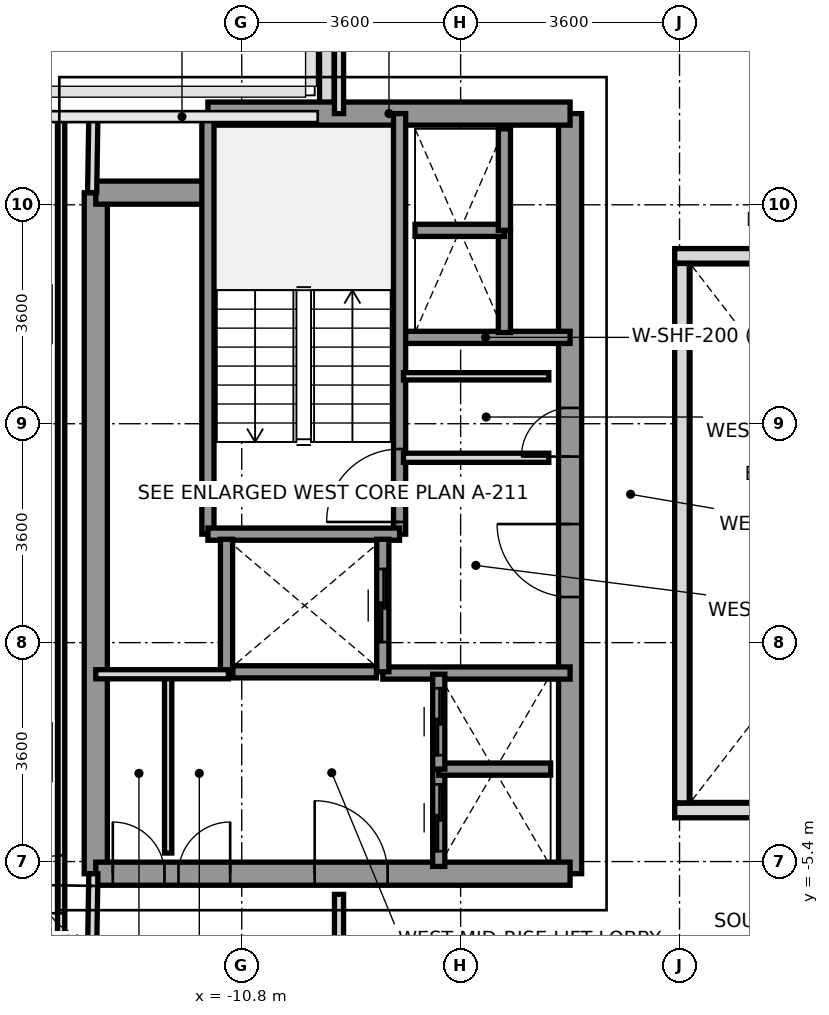
"""IFC4 building model, lengths in metres.
Left out: names, types, materials, properties, quantities, classifications, styles, units other than length and angle.
Written with IfcOpenShell. Run it as: python <this file> out.ifc"""

import sys

from ifc_helpers import new_model, si_unit, direction, frame, frame_2d, origin, place, context, subcontext, project, spatial, rectangle, extrude, source, transform, mapped, element, fill, save


model = new_model("IFC4")
c1 = context("Model", 3, precision=1e-05, world=origin(), true_north=direction((0.0, 1.0)))
c2 = subcontext(c1, "Body", "Model", "MODEL_VIEW")
j1 = project(units=[si_unit("LENGTHUNIT", "METRE"), si_unit("PLANEANGLEUNIT", "RADIAN")], contexts=[c1])
p1 = place(None, origin())
s1 = spatial("IfcSite", under=j1, at=p1, CompositionType="ELEMENT")
p2 = place(p1, origin())
s2 = spatial("IfcBuilding", under=s1, at=p2, CompositionType="ELEMENT")
p3 = place(p2, frame((0.0, 0.0, 167.2)))
s3 = spatial("IfcBuildingStorey", under=s2, at=p3, CompositionType="ELEMENT", Elevation=167.2)
p4 = place(p3, frame((-9.4, 6.953, 0.0), z_axis=(0.0, 0.0, 1.0), x_axis=(0.0, 1.0, 0.0)))
e1 = element("IfcWall", 1, at=p4, inside=s3, PredefinedType="PARAPET", context=c2, shape_type="SweptSolid", body=[
    extrude(rectangle(XDim=1.594, YDim=0.24, at=frame_2d((0.797, 0.0))), origin(), (0.0, 0.0, 1.0), 1.15),
])
p5 = place(p3, frame((-13.2, -5.6, 0.0), z_axis=(0.0, 0.0, 1.0), x_axis=(0.0, 1.0, 0.0)))
e2 = element("IfcWall", 2, at=p5, inside=s3, PredefinedType="SHEAR", context=c2, shape_type="SweptSolid", body=[
    extrude(rectangle(XDim=11.2, YDim=0.38, at=frame_2d((5.6, 0.0))), origin(), (0.0, 0.0, 1.0), 3.2),
])
p6 = place(p3, frame((-5.4, -5.6, 0.0), z_axis=(0.0, 0.0, 1.0), x_axis=(0.0, 1.0, 0.0)))
e3 = element("IfcWall", 3, at=p6, inside=s3, PredefinedType="SHEAR", context=c2, shape_type="SweptSolid", body=[
    extrude(rectangle(XDim=12.5, YDim=0.38, at=frame_2d((6.25, 0.0))), origin(), (0.0, 0.0, 1.0), 3.2),
])
p7 = place(p6, frame((4.55, 0.0, 0.0)))
e4 = element("IfcOpeningElement", 4, at=p7, cuts=e3, PredefinedType="OPENING", context=c2, shape_type="SweptSolid", body=[
    extrude(rectangle(XDim=1.2, YDim=2.2, at=frame_2d((0.6, 1.1))), frame((0.0, 0.2, 0.0), z_axis=(0.0, -1.0, 0.0), x_axis=(1.0, 0.0, 0.0)), (0.0, 0.0, 1.0), 0.4),
])
p8 = place(p6, frame((6.86, 0.0, 0.0)))
e5 = element("IfcOpeningElement", 5, at=p8, cuts=e3, PredefinedType="OPENING", context=c2, shape_type="SweptSolid", body=[
    extrude(rectangle(XDim=0.8, YDim=2.1, at=frame_2d((0.4, 1.05))), frame((0.0, 0.2, 0.0), z_axis=(0.0, -1.0, 0.0), x_axis=(1.0, 0.0, 0.0)), (0.0, 0.0, 1.0), 0.4),
])
p9 = place(p3, frame((-11.356, 6.9, 0.0), z_axis=(0.0, 0.0, 1.0), x_axis=(1.0, 0.0, 0.0)))
e6 = element("IfcWall", 6, at=p9, inside=s3, PredefinedType="SHEAR", context=c2, shape_type="SweptSolid", body=[
    extrude(rectangle(XDim=5.956, YDim=0.38, at=frame_2d((2.978, 0.0))), origin(), (0.0, 0.0, 1.0), 3.2),
])
p10 = place(p3, frame((-13.2, 5.6, 0.0), z_axis=(0.0, 0.0, 1.0), x_axis=(1.0, 0.0, 0.0)))
e7 = element("IfcWall", 7, at=p10, inside=s3, PredefinedType="SHEAR", context=c2, shape_type="SweptSolid", body=[
    extrude(rectangle(XDim=1.844, YDim=0.38, at=frame_2d((0.922, 0.0))), origin(), (0.0, 0.0, 1.0), 3.2),
])
p11 = place(p3, frame((-13.2, -5.6, 0.0), z_axis=(0.0, 0.0, 1.0), x_axis=(1.0, 0.0, 0.0)))
e8 = element("IfcWall", 8, at=p11, inside=s3, PredefinedType="SHEAR", context=c2, shape_type="SweptSolid", body=[
    extrude(rectangle(XDim=7.8, YDim=0.38, at=frame_2d((3.9, 0.0))), origin(), (0.0, 0.0, 1.0), 3.2),
])
p12 = place(p11, frame((3.6, 0.0, 0.0)))
e9 = element("IfcOpeningElement", 9, at=p12, cuts=e8, PredefinedType="OPENING", context=c2, shape_type="SweptSolid", body=[
    extrude(rectangle(XDim=1.2, YDim=2.2, at=frame_2d((0.6, 1.1))), frame((0.0, 0.2, 0.0), z_axis=(0.0, -1.0, 0.0), x_axis=(1.0, 0.0, 0.0)), (0.0, 0.0, 1.0), 0.4),
])
p13 = place(p11, frame((0.28, 0.0, 0.0)))
e10 = element("IfcOpeningElement", 10, at=p13, cuts=e8, PredefinedType="OPENING", context=c2, shape_type="SweptSolid", body=[
    extrude(rectangle(XDim=0.85, YDim=2.1, at=frame_2d((0.425, 1.05))), frame((0.0, 0.2, 0.0), z_axis=(0.0, -1.0, 0.0), x_axis=(1.0, 0.0, 0.0)), (0.0, 0.0, 1.0), 0.4),
])
p14 = place(p11, frame((1.36, 0.0, 0.0)))
e11 = element("IfcOpeningElement", 11, at=p14, cuts=e8, PredefinedType="OPENING", context=c2, shape_type="SweptSolid", body=[
    extrude(rectangle(XDim=0.85, YDim=2.1, at=frame_2d((0.425, 1.05))), frame((0.0, 0.2, 0.0), z_axis=(0.0, -1.0, 0.0), x_axis=(1.0, 0.0, 0.0)), (0.0, 0.0, 1.0), 0.4),
])
p15 = place(p3, frame((-8.18, 3.22, 0.0), z_axis=(0.0, 0.0, 1.0), x_axis=(1.0, 0.0, 0.0)))
e12 = element("IfcWall", 12, at=p15, inside=s3, PredefinedType="SOLIDWALL", context=c2, shape_type="SweptSolid", body=[
    extrude(rectangle(XDim=2.78, YDim=0.2, at=frame_2d((1.39, 0.0))), origin(), (0.0, 0.0, 1.0), 3.2),
])
p16 = place(p3, frame((-8.48, -2.3, 0.0), z_axis=(0.0, 0.0, 1.0), x_axis=(1.0, 0.0, 0.0)))
e13 = element("IfcWall", 13, at=p16, inside=s3, PredefinedType="SOLIDWALL", context=c2, shape_type="SweptSolid", body=[
    extrude(rectangle(XDim=3.08, YDim=0.2, at=frame_2d((1.54, 0.0))), origin(), (0.0, 0.0, 1.0), 3.2),
])
p17 = place(p3, frame((-8.204, -0.016, 0.0), z_axis=(0.0, 0.0, 1.0), x_axis=(0.0, 1.0, 0.0)))
e14 = element("IfcWall", 14, at=p17, inside=s3, PredefinedType="SOLIDWALL", context=c2, shape_type="SweptSolid", body=[
    extrude(rectangle(XDim=6.916, YDim=0.2, at=frame_2d((3.458, 0.0))), origin(), (0.0, 0.0, 1.0), 3.2),
])
p18 = place(p17, frame((0.2, 0.0, 0.0)))
e15 = element("IfcOpeningElement", 15, at=p18, cuts=e14, PredefinedType="OPENING", context=c2, shape_type="SweptSolid", body=[
    extrude(rectangle(XDim=1.2, YDim=2.2, at=frame_2d((0.6, 1.1))), frame((0.0, 0.11, 0.0), z_axis=(0.0, -1.0, 0.0), x_axis=(1.0, 0.0, 0.0)), (0.0, 0.0, 1.0), 0.22),
])
p19 = place(p3, frame((-11.356, -0.016, 0.0), z_axis=(0.0, 0.0, 1.0), x_axis=(0.0, 1.0, 0.0)))
e16 = element("IfcWall", 16, at=p19, inside=s3, PredefinedType="SOLIDWALL", context=c2, shape_type="SweptSolid", body=[
    extrude(rectangle(XDim=6.916, YDim=0.2, at=frame_2d((3.458, 0.0))), origin(), (0.0, 0.0, 1.0), 3.2),
])
p20 = place(p3, frame((-11.356, -0.016, 0.0), z_axis=(0.0, 0.0, 1.0), x_axis=(1.0, 0.0, 0.0)))
e17 = element("IfcWall", 17, at=p20, inside=s3, PredefinedType="SOLIDWALL", context=c2, shape_type="SweptSolid", body=[
    extrude(rectangle(XDim=3.152, YDim=0.2, at=frame_2d((1.576, 0.0))), origin(), (0.0, 0.0, 1.0), 3.2),
])
p21 = place(p3, frame((-11.05, -2.28, 0.0), z_axis=(0.0, 0.0, 1.0), x_axis=(0.0, 1.0, 0.0)))
e18 = element("IfcWall", 18, at=p21, inside=s3, PredefinedType="SOLIDWALL", context=c2, shape_type="SweptSolid", body=[
    extrude(rectangle(XDim=2.18, YDim=0.2, at=frame_2d((1.09, 0.0))), origin(), (0.0, 0.0, 1.0), 3.2),
])
p22 = place(p3, frame((-8.48, -2.28, 0.0), z_axis=(0.0, 0.0, 1.0), x_axis=(0.0, 1.0, 0.0)))
e19 = element("IfcWall", 19, at=p22, inside=s3, PredefinedType="SOLIDWALL", context=c2, shape_type="SweptSolid", body=[
    extrude(rectangle(XDim=2.18, YDim=0.2, at=frame_2d((1.09, 0.0))), origin(), (0.0, 0.0, 1.0), 3.2),
])
p23 = place(p22, frame((0.49, 0.0, 0.0)))
e20 = element("IfcOpeningElement", 20, at=p23, cuts=e19, PredefinedType="OPENING", context=c2, shape_type="SweptSolid", body=[
    extrude(rectangle(XDim=1.2, YDim=2.2, at=frame_2d((0.6, 1.1))), frame((0.0, 0.11, 0.0), z_axis=(0.0, -1.0, 0.0), x_axis=(1.0, 0.0, 0.0)), (0.0, 0.0, 1.0), 0.22),
])
p24 = place(p3, frame((-10.946, -2.28, 0.0), z_axis=(0.0, 0.0, 1.0), x_axis=(1.0, 0.0, 0.0)))
e21 = element("IfcWall", 21, at=p24, inside=s3, PredefinedType="SOLIDWALL", context=c2, shape_type="SweptSolid", body=[
    extrude(rectangle(XDim=2.362, YDim=0.2, at=frame_2d((1.181, 0.0))), origin(), (0.0, 0.0, 1.0), 3.2),
])
p25 = place(p3, frame((-7.56, -5.48, 0.0), z_axis=(0.0, 0.0, 1.0), x_axis=(0.0, 1.0, 0.0)))
e22 = element("IfcWall", 22, at=p25, inside=s3, PredefinedType="SOLIDWALL", context=c2, shape_type="SweptSolid", body=[
    extrude(rectangle(XDim=1.6, YDim=0.2, at=frame_2d((0.8, 0.0))), origin(), (0.0, 0.0, 1.0), 3.2),
])
p26 = place(p25, frame((0.25, 0.0, 0.0)))
e23 = element("IfcOpeningElement", 23, at=p26, cuts=e22, PredefinedType="OPENING", context=c2, shape_type="SweptSolid", body=[
    extrude(rectangle(XDim=1.1, YDim=2.2, at=frame_2d((0.55, 1.1))), frame((0.0, 0.11, 0.0), z_axis=(0.0, -1.0, 0.0), x_axis=(1.0, 0.0, 0.0)), (0.0, 0.0, 1.0), 0.22),
])
p27 = place(p3, frame((-7.56, -3.88, 0.0), z_axis=(0.0, 0.0, 1.0), x_axis=(1.0, 0.0, 0.0)))
e24 = element("IfcWall", 24, at=p27, inside=s3, PredefinedType="SOLIDWALL", context=c2, shape_type="SweptSolid", body=[
    extrude(rectangle(XDim=1.84, YDim=0.2, at=frame_2d((0.92, 0.0))), origin(), (0.0, 0.0, 1.0), 3.2),
])
p28 = place(p3, frame((-7.56, -3.88, 0.0), z_axis=(0.0, 0.0, 1.0), x_axis=(0.0, 1.0, 0.0)))
e25 = element("IfcWall", 25, at=p28, inside=s3, PredefinedType="SOLIDWALL", context=c2, shape_type="SweptSolid", body=[
    extrude(rectangle(XDim=1.56, YDim=0.2, at=frame_2d((0.78, 0.0))), origin(), (0.0, 0.0, 1.0), 3.2),
])
p29 = place(p28, frame((0.23, 0.0, 0.0)))
e26 = element("IfcOpeningElement", 26, at=p29, cuts=e25, PredefinedType="OPENING", context=c2, shape_type="SweptSolid", body=[
    extrude(rectangle(XDim=1.1, YDim=2.2, at=frame_2d((0.55, 1.1))), frame((0.0, 0.11, 0.0), z_axis=(0.0, -1.0, 0.0), x_axis=(1.0, 0.0, 0.0)), (0.0, 0.0, 1.0), 0.22),
])
p30 = place(p3, frame((-6.48, 3.3, 0.0), z_axis=(0.0, 0.0, 1.0), x_axis=(0.0, 1.0, 0.0)))
e27 = element("IfcWall", 27, at=p30, inside=s3, PredefinedType="SOLIDWALL", context=c2, shape_type="SweptSolid", body=[
    extrude(rectangle(XDim=1.68, YDim=0.2, at=frame_2d((0.84, 0.0))), origin(), (0.0, 0.0, 1.0), 3.2),
])
p31 = place(p3, frame((-7.95, 4.98, 0.0), z_axis=(0.0, 0.0, 1.0), x_axis=(1.0, 0.0, 0.0)))
e28 = element("IfcWall", 28, at=p31, inside=s3, PredefinedType="SOLIDWALL", context=c2, shape_type="SweptSolid", body=[
    extrude(rectangle(XDim=1.47, YDim=0.2, at=frame_2d((0.735, 0.0))), origin(), (0.0, 0.0, 1.0), 3.2),
])
p32 = place(p3, frame((-6.48, 4.98, 0.0), z_axis=(0.0, 0.0, 1.0), x_axis=(0.0, 1.0, 0.0)))
e29 = element("IfcWall", 29, at=p32, inside=s3, PredefinedType="SOLIDWALL", context=c2, shape_type="SweptSolid", body=[
    extrude(rectangle(XDim=1.67, YDim=0.2, at=frame_2d((0.835, 0.0))), origin(), (0.0, 0.0, 1.0), 3.2),
])
p33 = place(p3, frame((-8.14, 1.24, 0.0), z_axis=(0.0, 0.0, 1.0), x_axis=(1.0, 0.0, 0.0)))
e30 = element("IfcWall", 30, at=p33, inside=s3, PredefinedType="PARTITIONING", context=c2, shape_type="SweptSolid", body=[
    extrude(rectangle(XDim=2.39, YDim=0.15, at=frame_2d((1.195, 0.0))), origin(), (0.0, 0.0, 1.0), 2.3),
])
p34 = place(p3, frame((-8.14, 2.58, 0.0), z_axis=(0.0, 0.0, 1.0), x_axis=(1.0, 0.0, 0.0)))
e31 = element("IfcWall", 31, at=p34, inside=s3, PredefinedType="PARTITIONING", context=c2, shape_type="SweptSolid", body=[
    extrude(rectangle(XDim=2.39, YDim=0.12, at=frame_2d((1.195, 0.0))), origin(), (0.0, 0.0, 1.0), 2.3),
])
p35 = place(p3, frame((-12.01, -5.26, 0.0), z_axis=(0.0, 0.0, 1.0), x_axis=(0.0, 1.0, 0.0)))
e32 = element("IfcWall", 32, at=p35, inside=s3, PredefinedType="PARTITIONING", context=c2, shape_type="SweptSolid", body=[
    extrude(rectangle(XDim=2.94, YDim=0.12, at=frame_2d((1.47, 0.0))), origin(), (0.0, 0.0, 1.0), 3.2),
])
p36 = place(p3, frame((-13.2, -2.32, 0.0), z_axis=(0.0, 0.0, 1.0), x_axis=(1.0, 0.0, 0.0)))
e33 = element("IfcWall", 33, at=p36, inside=s3, PredefinedType="PARTITIONING", context=c2, shape_type="SweptSolid", body=[
    extrude(rectangle(XDim=2.18, YDim=0.15, at=frame_2d((1.09, 0.0))), origin(), (0.0, 0.0, 1.0), 3.2),
])
p37 = place(p3, frame((-9.2, 6.9, 0.0), z_axis=(0.0, 0.0, 1.0), x_axis=(0.0, 1.0, 0.0)))
e34 = element("IfcWall", 34, at=p37, inside=s3, PredefinedType="PARTITIONING", context=c2, shape_type="SweptSolid", body=[
    extrude(rectangle(XDim=8.78, YDim=0.15, at=frame_2d((4.39, 0.0))), origin(), (0.0, 0.0, 1.0), 2.75),
])
p38 = place(p3, frame((-9.2, -15.68, 0.0), z_axis=(0.0, 0.0, 1.0), x_axis=(0.0, 1.0, 0.0)))
e35 = element("IfcWall", 35, at=p38, inside=s3, PredefinedType="PARTITIONING", context=c2, shape_type="SweptSolid", body=[
    extrude(rectangle(XDim=9.74, YDim=0.15, at=frame_2d((4.87, 0.0))), origin(), (0.0, 0.0, 1.0), 2.75),
])
p39 = place(p3, frame((-13.26, 5.6, 0.0), z_axis=(0.0, 0.0, 1.0), x_axis=(0.016013571389, 0.999871774545, 0.0)))
e36 = element("IfcWall", 36, at=p39, inside=s3, PredefinedType="PARTITIONING", context=c2, shape_type="SweptSolid", body=[
    extrude(rectangle(XDim=1.25, YDim=0.15, at=frame_2d((0.625, 0.0))), origin(), (0.0, 0.0, 1.0), 3.2),
])
p40 = place(p3, frame((-13.26, -6.85, 0.0), z_axis=(0.0, 0.0, 1.0), x_axis=(0.016013571389, 0.999871774545, 0.0)))
e37 = element("IfcWall", 37, at=p40, inside=s3, PredefinedType="PARTITIONING", context=c2, shape_type="SweptSolid", body=[
    extrude(rectangle(XDim=1.25, YDim=0.15, at=frame_2d((0.625, 0.0))), origin(), (0.0, 0.0, 1.0), 3.2),
])
p41 = place(p40, frame((0.2, 0.0, 0.0)))
e38 = element("IfcOpeningElement", 38, at=p41, cuts=e37, PredefinedType="OPENING", context=c2, shape_type="SweptSolid", body=[
    extrude(rectangle(XDim=0.85, YDim=2.1, at=frame_2d((0.425, 1.05))), frame((0.0, 0.085, 0.0), z_axis=(0.0, -1.0, 0.0), x_axis=(1.0, 0.0, 0.0)), (0.0, 0.0, 1.0), 0.17),
])
p42 = place(p3, frame((-13.77, -6.85, 0.0), z_axis=(0.0, 0.0, 1.0), x_axis=(0.0, 1.0, 0.0)))
e39 = element("IfcWall", 39, at=p42, inside=s3, PredefinedType="PARTITIONING", context=c2, shape_type="SweptSolid", body=[
    extrude(rectangle(XDim=13.7, YDim=0.12, at=frame_2d((6.85, 0.0))), origin(), (0.0, 0.0, 1.0), 2.87),
])
p43 = place(p42, frame((0.6, 0.0, 0.0)))
e40 = element("IfcOpeningElement", 40, at=p43, cuts=e39, PredefinedType="OPENING", context=c2, shape_type="SweptSolid", body=[
    extrude(rectangle(XDim=0.95, YDim=2.15, at=frame_2d((0.475, 1.075))), frame((0.0, 0.07, 0.0), z_axis=(0.0, -1.0, 0.0), x_axis=(1.0, 0.0, 0.0)), (0.0, 0.0, 1.0), 0.14),
])
for number, where, z_axis, x_axis in (
    (41, (-3.68, -4.56, 0.0), (0.0, 0.0, 1.0), (1.0, 0.0, 0.0)),
    (42, (-3.68, 4.56, 0.0), (0.0, 0.0, 1.0), (1.0, 0.0, 0.0)),
):
    element("IfcWall", number, at=place(p3, frame(where, z_axis=z_axis, x_axis=x_axis)), inside=s3, PredefinedType="PARAPET", context=c2, shape_type="SweptSolid", body=[
        extrude(rectangle(XDim=7.36, YDim=0.24, at=frame_2d((3.68, 0.0))), origin(), (0.0, 0.0, 1.0), 1.15),
    ])
p44 = place(p3, frame((-3.56, -4.435, 0.0), z_axis=(0.0, 0.0, 1.0), x_axis=(0.0, 1.0, 0.0)))
e43 = element("IfcWall", 43, at=p44, inside=s3, PredefinedType="PARAPET", context=c2, shape_type="SweptSolid", body=[
    extrude(rectangle(XDim=8.87, YDim=0.24, at=frame_2d((4.435, 0.0))), origin(), (0.0, 0.0, 1.0), 1.15),
])
m1 = source(origin(), c2, "Body", "SweptSolid", [
    extrude(rectangle(XDim=1.2, YDim=2.2, at=frame_2d((0.6, 1.1))), frame((0.0, 0.025, 0.0), z_axis=(0.0, -1.0, 0.0), x_axis=(1.0, 0.0, 0.0)), (0.0, 0.0, 1.0), 0.05),
])
p45 = place(p18, origin())
e44 = element("IfcDoor", 44, at=p45, inside=s3, OperationType="SINGLE_SWING_LEFT", PredefinedType="DOOR", context=c2, shape_type="MappedRepresentation", body=[
    mapped(m1, transform((0.0, 0.0, 0.0), x_axis=(1.0, 0.0, 0.0), y_axis=(0.0, 1.0, 0.0), z_axis=(0.0, 0.0, 1.0), scale=1.0)),
])
fill(e15, e44)
p46 = place(p7, origin())
e45 = element("IfcDoor", 45, at=p46, inside=s3, OperationType="SINGLE_SWING_RIGHT", PredefinedType="DOOR", context=c2, shape_type="MappedRepresentation", body=[
    mapped(m1, transform((0.0, 0.0, 0.0), x_axis=(1.0, 0.0, 0.0), y_axis=(0.0, 1.0, 0.0), z_axis=(0.0, 0.0, 1.0), scale=1.0)),
])
fill(e4, e45)
p47 = place(p12, origin())
e46 = element("IfcDoor", 46, at=p47, inside=s3, OperationType="SINGLE_SWING_LEFT", PredefinedType="DOOR", context=c2, shape_type="MappedRepresentation", body=[
    mapped(m1, transform((0.0, 0.0, 0.0), x_axis=(1.0, 0.0, 0.0), y_axis=(0.0, 1.0, 0.0), z_axis=(0.0, 0.0, 1.0), scale=1.0)),
])
fill(e9, e46)
m2 = source(origin(), c2, "Body", "SweptSolid", [
    extrude(rectangle(XDim=0.8, YDim=2.1, at=frame_2d((0.4, 1.05))), frame((0.0, 0.025, 0.0), z_axis=(0.0, -1.0, 0.0), x_axis=(1.0, 0.0, 0.0)), (0.0, 0.0, 1.0), 0.05),
])
p48 = place(p8, origin())
e47 = element("IfcDoor", 47, at=p48, inside=s3, OperationType="SINGLE_SWING_LEFT", PredefinedType="DOOR", context=c2, shape_type="MappedRepresentation", body=[
    mapped(m2, transform((0.0, 0.0, 0.0), x_axis=(1.0, 0.0, 0.0), y_axis=(0.0, 1.0, 0.0), z_axis=(0.0, 0.0, 1.0), scale=1.0)),
])
fill(e5, e47)
m3 = source(origin(), c2, "Body", "SweptSolid", [
    extrude(rectangle(XDim=0.85, YDim=2.1, at=frame_2d((0.425, 1.05))), frame((0.0, 0.025, 0.0), z_axis=(0.0, -1.0, 0.0), x_axis=(1.0, 0.0, 0.0)), (0.0, 0.0, 1.0), 0.05),
])
p49 = place(p13, origin())
e48 = element("IfcDoor", 48, at=p49, inside=s3, OperationType="SINGLE_SWING_LEFT", PredefinedType="DOOR", context=c2, shape_type="MappedRepresentation", body=[
    mapped(m3, transform((0.0, 0.0, 0.0), x_axis=(1.0, 0.0, 0.0), y_axis=(0.0, 1.0, 0.0), z_axis=(0.0, 0.0, 1.0), scale=1.0)),
])
fill(e10, e48)
p50 = place(p14, origin())
e49 = element("IfcDoor", 49, at=p50, inside=s3, OperationType="SINGLE_SWING_RIGHT", PredefinedType="DOOR", context=c2, shape_type="MappedRepresentation", body=[
    mapped(m3, transform((0.0, 0.0, 0.0), x_axis=(1.0, 0.0, 0.0), y_axis=(0.0, 1.0, 0.0), z_axis=(0.0, 0.0, 1.0), scale=1.0)),
])
fill(e11, e49)
p51 = place(p23, origin())
e50 = element("IfcDoor", 50, at=p51, inside=s3, OperationType="SLIDING_TO_RIGHT", PredefinedType="DOOR", context=c2, shape_type="MappedRepresentation", body=[
    mapped(m1, transform((0.0, 0.0, 0.0), x_axis=(1.0, 0.0, 0.0), y_axis=(0.0, 1.0, 0.0), z_axis=(0.0, 0.0, 1.0), scale=1.0)),
])
fill(e20, e50)
m4 = source(origin(), c2, "Body", "SweptSolid", [
    extrude(rectangle(XDim=1.1, YDim=2.2, at=frame_2d((0.55, 1.1))), frame((0.0, 0.025, 0.0), z_axis=(0.0, -1.0, 0.0), x_axis=(1.0, 0.0, 0.0)), (0.0, 0.0, 1.0), 0.05),
])
p52 = place(p26, origin())
e51 = element("IfcDoor", 51, at=p52, inside=s3, OperationType="SLIDING_TO_LEFT", PredefinedType="DOOR", context=c2, shape_type="MappedRepresentation", body=[
    mapped(m4, transform((0.0, 0.0, 0.0), x_axis=(1.0, 0.0, 0.0), y_axis=(0.0, 1.0, 0.0), z_axis=(0.0, 0.0, 1.0), scale=1.0)),
])
fill(e23, e51)
p53 = place(p29, origin())
e52 = element("IfcDoor", 52, at=p53, inside=s3, OperationType="SLIDING_TO_LEFT", PredefinedType="DOOR", context=c2, shape_type="MappedRepresentation", body=[
    mapped(m4, transform((0.0, 0.0, 0.0), x_axis=(1.0, 0.0, 0.0), y_axis=(0.0, 1.0, 0.0), z_axis=(0.0, 0.0, 1.0), scale=1.0)),
])
fill(e26, e52)
m5 = source(origin(), c2, "Body", "SweptSolid", [
    extrude(rectangle(XDim=0.95, YDim=2.15, at=frame_2d((0.475, 1.075))), frame((0.0, 0.025, 0.0), z_axis=(0.0, -1.0, 0.0), x_axis=(1.0, 0.0, 0.0)), (0.0, 0.0, 1.0), 0.05),
])
p54 = place(p43, origin())
e53 = element("IfcDoor", 53, at=p54, inside=s3, OperationType="SINGLE_SWING_LEFT", PredefinedType="DOOR", context=c2, shape_type="MappedRepresentation", body=[
    mapped(m5, transform((0.0, 0.0, 0.0), x_axis=(1.0, 0.0, 0.0), y_axis=(0.0, 1.0, 0.0), z_axis=(0.0, 0.0, 1.0), scale=1.0)),
])
fill(e40, e53)
p55 = place(p41, origin())
e54 = element("IfcDoor", 54, at=p55, inside=s3, OperationType="SINGLE_SWING_RIGHT", PredefinedType="DOOR", context=c2, shape_type="MappedRepresentation", body=[
    mapped(m3, transform((0.0, 0.0, 0.0), x_axis=(1.0, 0.0, 0.0), y_axis=(0.0, 1.0, 0.0), z_axis=(0.0, 0.0, 1.0), scale=1.0)),
])
fill(e38, e54)
save(model, sys.argv[1])
